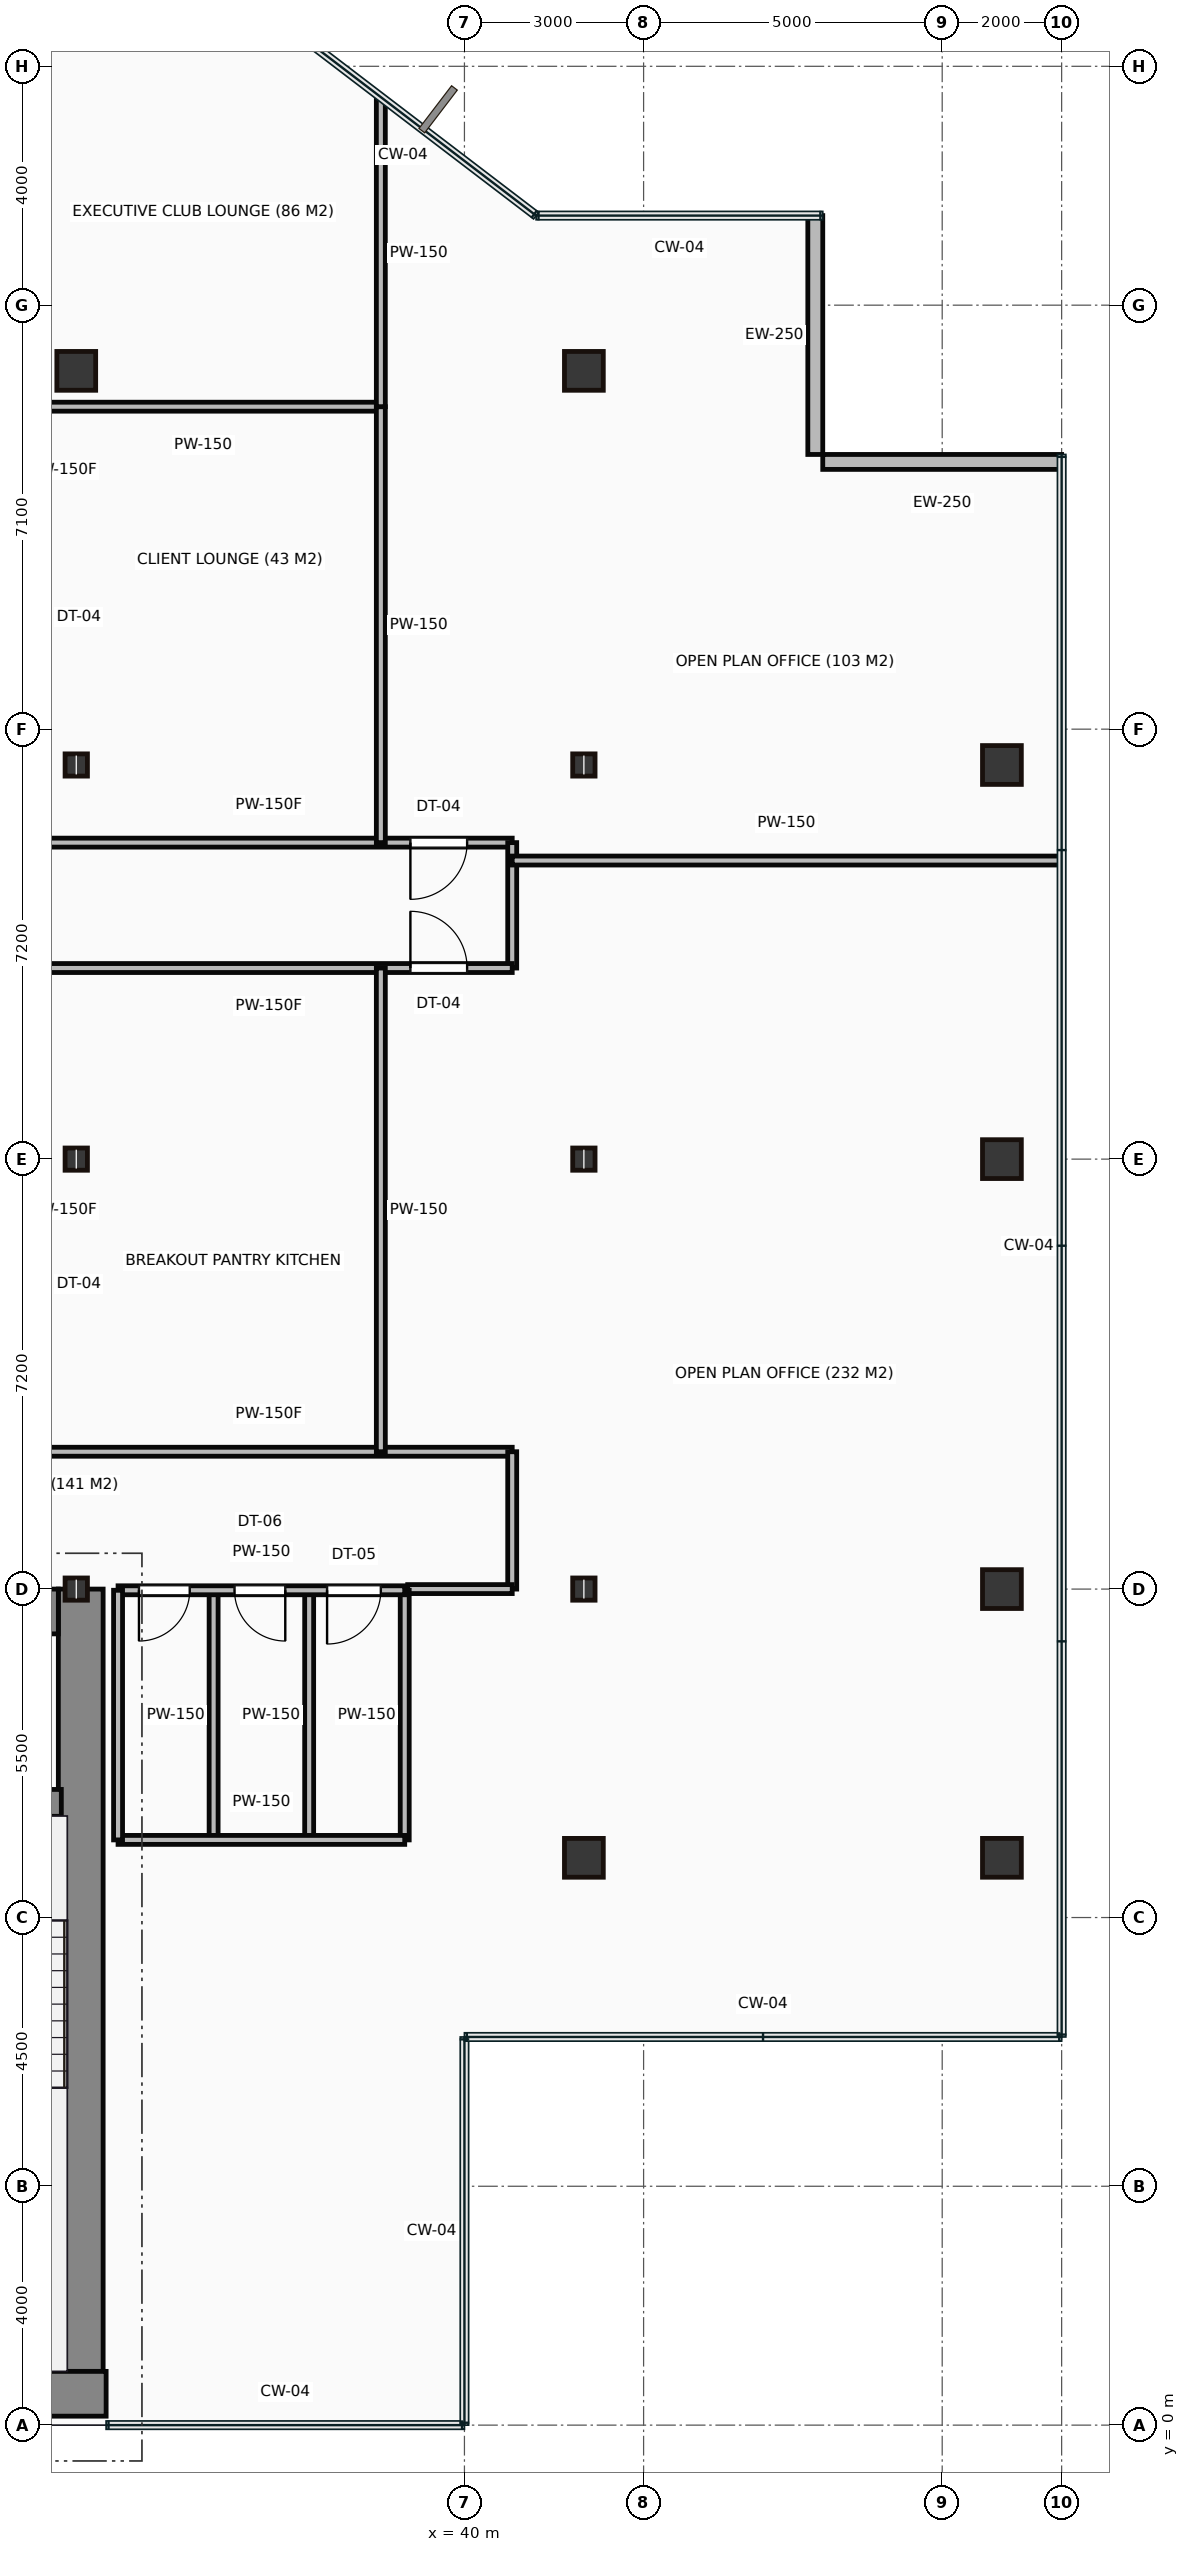
"""IFC4 building model, lengths in metres.
Left out: names, types, materials, properties, quantities, classifications, styles, units other than length and angle.
Written with IfcOpenShell. Run it as: python <this file> out.ifc"""

import sys

from ifc_helpers import new_model, si_unit, direction, frame, frame_2d, origin, origin_2d, place, context, subcontext, project, spatial, rectangle, hollow_rectangle, i_section, extrude, source, transform, mapped, element, fill, save


model = new_model("IFC4")
c1 = context("Model", 3, precision=1e-05, world=origin(), true_north=direction((0.0, 1.0)))
c2 = subcontext(c1, "Body", "Model", "MODEL_VIEW")
j1 = project(units=[si_unit("LENGTHUNIT", "METRE"), si_unit("PLANEANGLEUNIT", "RADIAN")], contexts=[c1])
p1 = place(None, origin())
s1 = spatial("IfcSite", under=j1, at=p1, CompositionType="ELEMENT")
p2 = place(p1, origin())
s2 = spatial("IfcBuilding", under=s1, at=p2, CompositionType="ELEMENT")
p3 = place(p2, frame((0.0, 0.0, 166.15)))
s3 = spatial("IfcBuildingStorey", under=s2, at=p3, CompositionType="ELEMENT", Elevation=166.15)
m1 = source(origin(), c2, "Body", "SweptSolid", [
    extrude(rectangle(XDim=29.5, YDim=0.75, at=frame_2d((14.75, 0.0))), origin(), (0.0, 0.0, 1.0), 3.65),
])
p4 = place(p3, frame((4.5, 0.525, 0.0), z_axis=(0.0, 0.0, 1.0), x_axis=(1.0, 0.0, 0.0)))
e1 = element("IfcWall", 1, at=p4, inside=s3, PredefinedType="SHEAR", context=c2, shape_type="MappedRepresentation", body=[
    mapped(m1, transform((0.0, 0.0, 0.0))),
])
m2 = source(origin(), c2, "Body", "SweptSolid", [
    extrude(rectangle(XDim=13.1, YDim=0.75, at=frame_2d((6.55, 0.0))), origin(), (0.0, 0.0, 1.0), 3.65),
])
p5 = place(p3, frame((33.575, 0.9, 0.0), z_axis=(0.0, 0.0, 1.0), x_axis=(0.0, 1.0, 0.0)))
e2 = element("IfcWall", 2, at=p5, inside=s3, PredefinedType="SHEAR", context=c2, shape_type="MappedRepresentation", body=[
    mapped(m2, transform((0.0, 0.0, 0.0))),
])
m3 = source(origin(), c2, "Body", "SweptSolid", [
    extrude(rectangle(XDim=12.6, YDim=0.75, at=frame_2d((6.3, 0.0))), origin(), (0.0, 0.0, 1.0), 3.65),
])
p6 = place(p3, frame((20.6, 13.625, 0.0), z_axis=(0.0, 0.0, 1.0), x_axis=(1.0, 0.0, 0.0)))
e3 = element("IfcWall", 3, at=p6, inside=s3, PredefinedType="SHEAR", context=c2, shape_type="MappedRepresentation", body=[
    mapped(m3, transform((0.0, 0.0, 0.0))),
])
p7 = place(p6, frame((9.25, 0.0, 0.0)))
e4 = element("IfcOpeningElement", 4, at=p7, cuts=e3, PredefinedType="OPENING", context=c2, shape_type="SweptSolid", body=[
    extrude(rectangle(XDim=1.1, YDim=2.15, at=frame_2d((0.55, 1.075))), frame((0.0, 0.385, 0.0), z_axis=(0.0, -1.0, 0.0), x_axis=(1.0, 0.0, 0.0)), (0.0, 0.0, 1.0), 0.77),
])
m4 = source(origin(), c2, "Body", "SweptSolid", [
    extrude(rectangle(XDim=3.39, YDim=0.45, at=frame_2d((1.695, 0.0))), origin(), (0.0, 0.0, 1.0), 3.65),
])
p8 = place(p3, frame((29.86, 10.42, 0.0), z_axis=(0.0, 0.0, 1.0), x_axis=(1.0, 0.0, 0.0)))
e5 = element("IfcWall", 5, at=p8, inside=s3, PredefinedType="SHEAR", context=c2, shape_type="MappedRepresentation", body=[
    mapped(m4, transform((0.0, 0.0, 0.0))),
])
p9 = place(p8, frame((1.1, 0.0, 0.0)))
e6 = element("IfcOpeningElement", 6, at=p9, cuts=e5, PredefinedType="OPENING", context=c2, shape_type="SweptSolid", body=[
    extrude(rectangle(XDim=1.1, YDim=2.15, at=frame_2d((0.55, 1.075))), frame((0.0, 0.235, 0.0), z_axis=(0.0, -1.0, 0.0), x_axis=(1.0, 0.0, 0.0)), (0.0, 0.0, 1.0), 0.47),
])
m5 = source(origin(), c2, "Body", "SweptSolid", [
    extrude(i_section(OverallWidth=0.374, OverallDepth=0.372, WebThickness=0.016, FlangeThickness=0.026, at=origin_2d()), origin(), (0.0, 0.0, 1.0), 3.65),
])
for number, where, z_axis, x_axis in (
    (7, (33.5, 14.0, 0.0), (0.0, 0.0, 1.0), (1.0, 0.0, 0.0)),
    (8, (33.5, 21.2, 0.0), (0.0, 0.0, 1.0), (1.0, 0.0, 0.0)),
    (9, (33.5, 27.8, 0.0), (0.0, 0.0, 1.0), (1.0, 0.0, 0.0)),
):
    element("IfcColumn", number, at=place(p3, frame(where, z_axis=z_axis, x_axis=x_axis)), inside=s3, PredefinedType="COLUMN", context=c2, shape_type="MappedRepresentation", body=[
        mapped(m5, transform((0.0, 0.0, 0.0))),
    ])
m6 = source(origin(), c2, "Body", "SweptSolid", [
    extrude(hollow_rectangle(XDim=0.65, YDim=0.65, WallThickness=0.032, at=origin_2d()), origin(), (0.0, 0.0, 1.0), 3.65),
])
for number, where, z_axis, x_axis in (
    (10, (33.5, 34.4, 0.0), (0.0, 0.0, 1.0), (1.0, 0.0, 0.0)),
    (11, (42.0, 9.5, 0.0), (0.0, 0.0, 1.0), (1.0, 0.0, 0.0)),
):
    element("IfcColumn", number, at=place(p3, frame(where, z_axis=z_axis, x_axis=x_axis)), inside=s3, PredefinedType="COLUMN", context=c2, shape_type="MappedRepresentation", body=[
        mapped(m6, transform((0.0, 0.0, 0.0))),
    ])
for number, where, z_axis, x_axis in (
    (12, (42.0, 14.0, 0.0), (0.0, 0.0, 1.0), (1.0, 0.0, 0.0)),
    (13, (42.0, 21.2, 0.0), (0.0, 0.0, 1.0), (1.0, 0.0, 0.0)),
    (14, (42.0, 27.8, 0.0), (0.0, 0.0, 1.0), (1.0, 0.0, 0.0)),
):
    element("IfcColumn", number, at=place(p3, frame(where, z_axis=z_axis, x_axis=x_axis)), inside=s3, PredefinedType="COLUMN", context=c2, shape_type="MappedRepresentation", body=[
        mapped(m5, transform((0.0, 0.0, 0.0))),
    ])
for number, where, z_axis, x_axis in (
    (15, (42.0, 34.4, 0.0), (0.0, 0.0, 1.0), (1.0, 0.0, 0.0)),
    (16, (49.0, 9.5, 0.0), (0.0, 0.0, 1.0), (1.0, 0.0, 0.0)),
    (17, (49.0, 14.0, 0.0), (0.0, 0.0, 1.0), (1.0, 0.0, 0.0)),
    (18, (49.0, 21.2, 0.0), (0.0, 0.0, 1.0), (1.0, 0.0, 0.0)),
    (19, (49.0, 27.8, 0.0), (0.0, 0.0, 1.0), (1.0, 0.0, 0.0)),
):
    element("IfcColumn", number, at=place(p3, frame(where, z_axis=z_axis, x_axis=x_axis)), inside=s3, PredefinedType="COLUMN", context=c2, shape_type="MappedRepresentation", body=[
        mapped(m6, transform((0.0, 0.0, 0.0))),
    ])
m7 = source(origin(), c2, "Body", "SweptSolid", [
    extrude(rectangle(XDim=4.0, YDim=0.25, at=frame_2d((2.0, 0.0))), origin(), (0.0, 0.0, 1.0), 3.4),
])
for number, where, z_axis, x_axis in (
    (20, (50.0, 32.875, 0.0), (0.0, 0.0, 1.0), (-1.0, 0.0, 0.0)),
    (21, (45.875, 33.0, 0.0), (0.0, 0.0, 1.0), (0.0, 1.0, 0.0)),
):
    element("IfcWall", number, at=place(p3, frame(where, z_axis=z_axis, x_axis=x_axis)), inside=s3, PredefinedType="STANDARD", context=c2, shape_type="MappedRepresentation", body=[
        mapped(m7, transform((0.0, 0.0, 0.0))),
    ])
m8 = source(origin(), c2, "Body", "SweptSolid", [
    extrude(rectangle(XDim=4.8, YDim=0.15, at=frame_2d((2.4, 0.0))), origin(), (0.0, 0.0, 1.0), 2.76),
])
p10 = place(p3, frame((34.2, 13.98, 0.0), z_axis=(0.0, 0.0, 1.0), x_axis=(1.0, 0.0, 0.0)))
e22 = element("IfcWall", 22, at=p10, inside=s3, PredefinedType="PARTITIONING", context=c2, shape_type="MappedRepresentation", body=[
    mapped(m8, transform((0.0, 0.0, 0.0))),
])
p11 = place(p10, frame((0.35, 0.0, 0.0)))
e23 = element("IfcOpeningElement", 23, at=p11, cuts=e22, PredefinedType="OPENING", context=c2, shape_type="SweptSolid", body=[
    extrude(rectangle(XDim=0.85, YDim=2.1, at=frame_2d((0.425, 1.05))), frame((0.0, 0.085, 0.0), z_axis=(0.0, -1.0, 0.0), x_axis=(1.0, 0.0, 0.0)), (0.0, 0.0, 1.0), 0.17),
])
p12 = place(p10, frame((1.95, 0.0, 0.0)))
e24 = element("IfcOpeningElement", 24, at=p12, cuts=e22, PredefinedType="OPENING", context=c2, shape_type="SweptSolid", body=[
    extrude(rectangle(XDim=0.85, YDim=2.1, at=frame_2d((0.425, 1.05))), frame((0.0, 0.085, 0.0), z_axis=(0.0, -1.0, 0.0), x_axis=(1.0, 0.0, 0.0)), (0.0, 0.0, 1.0), 0.17),
])
p13 = place(p10, frame((3.5, 0.0, 0.0)))
e25 = element("IfcOpeningElement", 25, at=p13, cuts=e22, PredefinedType="OPENING", context=c2, shape_type="SweptSolid", body=[
    extrude(rectangle(XDim=0.9, YDim=2.1, at=frame_2d((0.45, 1.05))), frame((0.0, 0.085, 0.0), z_axis=(0.0, -1.0, 0.0), x_axis=(1.0, 0.0, 0.0)), (0.0, 0.0, 1.0), 0.17),
])
m9 = source(origin(), c2, "Body", "SweptSolid", [
    extrude(rectangle(XDim=4.8, YDim=0.15, at=frame_2d((2.4, 0.0))), origin(), (0.0, 0.0, 1.0), 3.4),
])
p14 = place(p3, frame((34.2, 9.8, 0.0), z_axis=(0.0, 0.0, 1.0), x_axis=(1.0, 0.0, 0.0)))
e26 = element("IfcWall", 26, at=p14, inside=s3, PredefinedType="PARTITIONING", context=c2, shape_type="MappedRepresentation", body=[
    mapped(m9, transform((0.0, 0.0, 0.0))),
])
m10 = source(origin(), c2, "Body", "SweptSolid", [
    extrude(rectangle(XDim=4.18, YDim=0.15, at=frame_2d((2.09, 0.0))), origin(), (0.0, 0.0, 1.0), 3.4),
])
for number, where, z_axis, x_axis in (
    (27, (39.0, 9.8, 0.0), (0.0, 0.0, 1.0), (0.0, 1.0, 0.0)),
    (28, (34.2, 9.8, 0.0), (0.0, 0.0, 1.0), (0.0, 1.0, 0.0)),
    (29, (35.8, 9.8, 0.0), (0.0, 0.0, 1.0), (0.0, 1.0, 0.0)),
    (30, (37.4, 9.8, 0.0), (0.0, 0.0, 1.0), (0.0, 1.0, 0.0)),
):
    element("IfcWall", number, at=place(p3, frame(where, z_axis=z_axis, x_axis=x_axis)), inside=s3, PredefinedType="PARTITIONING", context=c2, shape_type="MappedRepresentation", body=[
        mapped(m10, transform((0.0, 0.0, 0.0))),
    ])
m11 = source(origin(), c2, "Body", "SweptSolid", [
    extrude(rectangle(XDim=8.15, YDim=0.15, at=frame_2d((4.075, 0.0))), origin(), (0.0, 0.0, 1.0), 3.4),
])
p15 = place(p3, frame((32.65, 26.5, 0.0), z_axis=(0.0, 0.0, 1.0), x_axis=(1.0, 0.0, 0.0)))
e31 = element("IfcWall", 31, at=p15, inside=s3, PredefinedType="PARTITIONING", context=c2, shape_type="MappedRepresentation", body=[
    mapped(m11, transform((0.0, 0.0, 0.0))),
])
p16 = place(p15, frame((6.445, 0.0, 0.0)))
e32 = element("IfcOpeningElement", 32, at=p16, cuts=e31, PredefinedType="OPENING", context=c2, shape_type="SweptSolid", body=[
    extrude(rectangle(XDim=0.95, YDim=2.15, at=frame_2d((0.475, 1.075))), frame((0.0, 0.085, 0.0), z_axis=(0.0, -1.0, 0.0), x_axis=(1.0, 0.0, 0.0)), (0.0, 0.0, 1.0), 0.17),
])
m12 = source(origin(), c2, "Body", "SweptSolid", [
    extrude(rectangle(XDim=2.1, YDim=0.15, at=frame_2d((1.05, 0.0))), origin(), (0.0, 0.0, 1.0), 3.4),
])
p17 = place(p3, frame((40.8, 26.5, 0.0), z_axis=(0.0, 0.0, 1.0), x_axis=(0.0, -1.0, 0.0)))
e33 = element("IfcWall", 33, at=p17, inside=s3, PredefinedType="PARTITIONING", context=c2, shape_type="MappedRepresentation", body=[
    mapped(m12, transform((0.0, 0.0, 0.0))),
])
p18 = place(p3, frame((40.8, 24.4, 0.0), z_axis=(0.0, 0.0, 1.0), x_axis=(-1.0, 0.0, 0.0)))
e34 = element("IfcWall", 34, at=p18, inside=s3, PredefinedType="PARTITIONING", context=c2, shape_type="MappedRepresentation", body=[
    mapped(m11, transform((0.0, 0.0, 0.0))),
])
p19 = place(p18, frame((0.755, 0.0, 0.0)))
e35 = element("IfcOpeningElement", 35, at=p19, cuts=e34, PredefinedType="OPENING", context=c2, shape_type="SweptSolid", body=[
    extrude(rectangle(XDim=0.95, YDim=2.15, at=frame_2d((0.475, 1.075))), frame((0.0, 0.085, 0.0), z_axis=(0.0, -1.0, 0.0), x_axis=(1.0, 0.0, 0.0)), (0.0, 0.0, 1.0), 0.17),
])
p20 = place(p3, frame((32.65, 16.3, 0.0), z_axis=(0.0, 0.0, 1.0), x_axis=(1.0, 0.0, 0.0)))
e36 = element("IfcWall", 36, at=p20, inside=s3, PredefinedType="PARTITIONING", context=c2, shape_type="MappedRepresentation", body=[
    mapped(m11, transform((0.0, 0.0, 0.0))),
])
m13 = source(origin(), c2, "Body", "SweptSolid", [
    extrude(rectangle(XDim=2.3, YDim=0.15, at=frame_2d((1.15, 0.0))), origin(), (0.0, 0.0, 1.0), 3.4),
])
p21 = place(p3, frame((40.8, 16.3, 0.0), z_axis=(0.0, 0.0, 1.0), x_axis=(0.0, -1.0, 0.0)))
e37 = element("IfcWall", 37, at=p21, inside=s3, PredefinedType="PARTITIONING", context=c2, shape_type="MappedRepresentation", body=[
    mapped(m13, transform((0.0, 0.0, 0.0))),
])
m14 = source(origin(), c2, "Body", "SweptSolid", [
    extrude(rectangle(XDim=1.75, YDim=0.15, at=frame_2d((0.875, 0.0))), origin(), (0.0, 0.0, 1.0), 2.76),
])
p22 = place(p3, frame((40.8, 14.0, 0.0), z_axis=(0.0, 0.0, 1.0), x_axis=(-1.0, 0.0, 0.0)))
e38 = element("IfcWall", 38, at=p22, inside=s3, PredefinedType="PARTITIONING", context=c2, shape_type="MappedRepresentation", body=[
    mapped(m14, transform((0.0, 0.0, 0.0))),
])
m15 = source(origin(), c2, "Body", "SweptSolid", [
    extrude(rectangle(XDim=5.95, YDim=0.15, at=frame_2d((2.975, 0.0))), origin(), (0.0, 0.0, 1.0), 3.4),
])
p23 = place(p3, frame((38.6, 33.8, 0.0), z_axis=(0.0, 0.0, 1.0), x_axis=(-1.0, 0.0, 0.0)))
e39 = element("IfcWall", 39, at=p23, inside=s3, PredefinedType="PARTITIONING", context=c2, shape_type="MappedRepresentation", body=[
    mapped(m15, transform((0.0, 0.0, 0.0))),
])
m16 = source(origin(), c2, "Body", "SweptSolid", [
    extrude(rectangle(XDim=8.1, YDim=0.15, at=frame_2d((4.05, 0.0))), origin(), (0.0, 0.0, 1.0), 3.4),
])
p24 = place(p3, frame((38.6, 24.4, 0.0), z_axis=(0.0, 0.0, 1.0), x_axis=(0.0, -1.0, 0.0)))
e40 = element("IfcWall", 40, at=p24, inside=s3, PredefinedType="PARTITIONING", context=c2, shape_type="MappedRepresentation", body=[
    mapped(m16, transform((0.0, 0.0, 0.0))),
])
m17 = source(origin(), c2, "Body", "SweptSolid", [
    extrude(rectangle(XDim=7.3, YDim=0.15, at=frame_2d((3.65, 0.0))), origin(), (0.0, 0.0, 1.0), 3.4),
])
p25 = place(p3, frame((38.6, 33.8, 0.0), z_axis=(0.0, 0.0, 1.0), x_axis=(0.0, -1.0, 0.0)))
e41 = element("IfcWall", 41, at=p25, inside=s3, PredefinedType="PARTITIONING", context=c2, shape_type="MappedRepresentation", body=[
    mapped(m17, transform((0.0, 0.0, 0.0))),
])
m18 = source(origin(), c2, "Body", "SweptSolid", [
    extrude(rectangle(XDim=5.159, YDim=0.15, at=frame_2d((2.58, 0.0))), origin(), (0.0, 0.0, 1.0), 3.4),
])
p26 = place(p3, frame((38.6, 38.959, 0.0), z_axis=(0.0, 0.0, 1.0), x_axis=(0.0, -1.0, 0.0)))
e42 = element("IfcWall", 42, at=p26, inside=s3, PredefinedType="PARTITIONING", context=c2, shape_type="MappedRepresentation", body=[
    mapped(m18, transform((0.0, 0.0, 0.0))),
])
m19 = source(origin(), c2, "Body", "SweptSolid", [
    extrude(rectangle(XDim=9.18, YDim=0.15, at=frame_2d((4.59, 0.0))), origin(), (0.0, 0.0, 1.0), 3.4),
])
p27 = place(p3, frame((40.8, 26.2, 0.0), z_axis=(0.0, 0.0, 1.0), x_axis=(1.0, 0.0, 0.0)))
e43 = element("IfcWall", 43, at=p27, inside=s3, PredefinedType="PARTITIONING", context=c2, shape_type="MappedRepresentation", body=[
    mapped(m19, transform((0.0, 0.0, 0.0))),
])
m20 = source(origin(), c2, "Body", "SweptSolid", [
    extrude(rectangle(XDim=0.85, YDim=2.1, at=frame_2d((0.425, 1.05))), frame((0.0, 0.025, 0.0), z_axis=(0.0, -1.0, 0.0), x_axis=(1.0, 0.0, 0.0)), (0.0, 0.0, 1.0), 0.05),
])
p28 = place(p11, frame((0.85, 0.0, 0.0), z_axis=(0.0, 0.0, 1.0), x_axis=(-1.0, 0.0, 0.0)))
e44 = element("IfcDoor", 44, at=p28, inside=s3, OperationType="SINGLE_SWING_LEFT", PredefinedType="DOOR", context=c2, shape_type="MappedRepresentation", body=[
    mapped(m20, transform((0.0, 0.0, 0.0))),
])
fill(e23, e44)
p29 = place(p12, frame((0.85, 0.0, 0.0), z_axis=(0.0, 0.0, 1.0), x_axis=(-1.0, 0.0, 0.0)))
e45 = element("IfcDoor", 45, at=p29, inside=s3, OperationType="SINGLE_SWING_RIGHT", PredefinedType="DOOR", context=c2, shape_type="MappedRepresentation", body=[
    mapped(m20, transform((0.0, 0.0, 0.0))),
])
fill(e24, e45)
m21 = source(origin(), c2, "Body", "SweptSolid", [
    extrude(rectangle(XDim=0.9, YDim=2.1, at=frame_2d((0.45, 1.05))), frame((0.0, 0.025, 0.0), z_axis=(0.0, -1.0, 0.0), x_axis=(1.0, 0.0, 0.0)), (0.0, 0.0, 1.0), 0.05),
])
p30 = place(p13, frame((0.9, 0.0, 0.0), z_axis=(0.0, 0.0, 1.0), x_axis=(-1.0, 0.0, 0.0)))
e46 = element("IfcDoor", 46, at=p30, inside=s3, OperationType="SINGLE_SWING_LEFT", PredefinedType="DOOR", context=c2, shape_type="MappedRepresentation", body=[
    mapped(m21, transform((0.0, 0.0, 0.0))),
])
fill(e25, e46)
m22 = source(origin(), c2, "Body", "SweptSolid", [
    extrude(rectangle(XDim=0.95, YDim=2.15, at=frame_2d((0.475, 1.075))), frame((0.0, 0.025, 0.0), z_axis=(0.0, -1.0, 0.0), x_axis=(1.0, 0.0, 0.0)), (0.0, 0.0, 1.0), 0.05),
])
p31 = place(p19, origin())
e47 = element("IfcDoor", 47, at=p31, inside=s3, OperationType="SINGLE_SWING_RIGHT", PredefinedType="DOOR", context=c2, shape_type="MappedRepresentation", body=[
    mapped(m22, transform((0.0, 0.0, 0.0))),
])
fill(e35, e47)
p32 = place(p16, origin())
e48 = element("IfcDoor", 48, at=p32, inside=s3, OperationType="SINGLE_SWING_LEFT", PredefinedType="DOOR", context=c2, shape_type="MappedRepresentation", body=[
    mapped(m22, transform((0.0, 0.0, 0.0))),
])
fill(e32, e48)
save(model, sys.argv[1])
